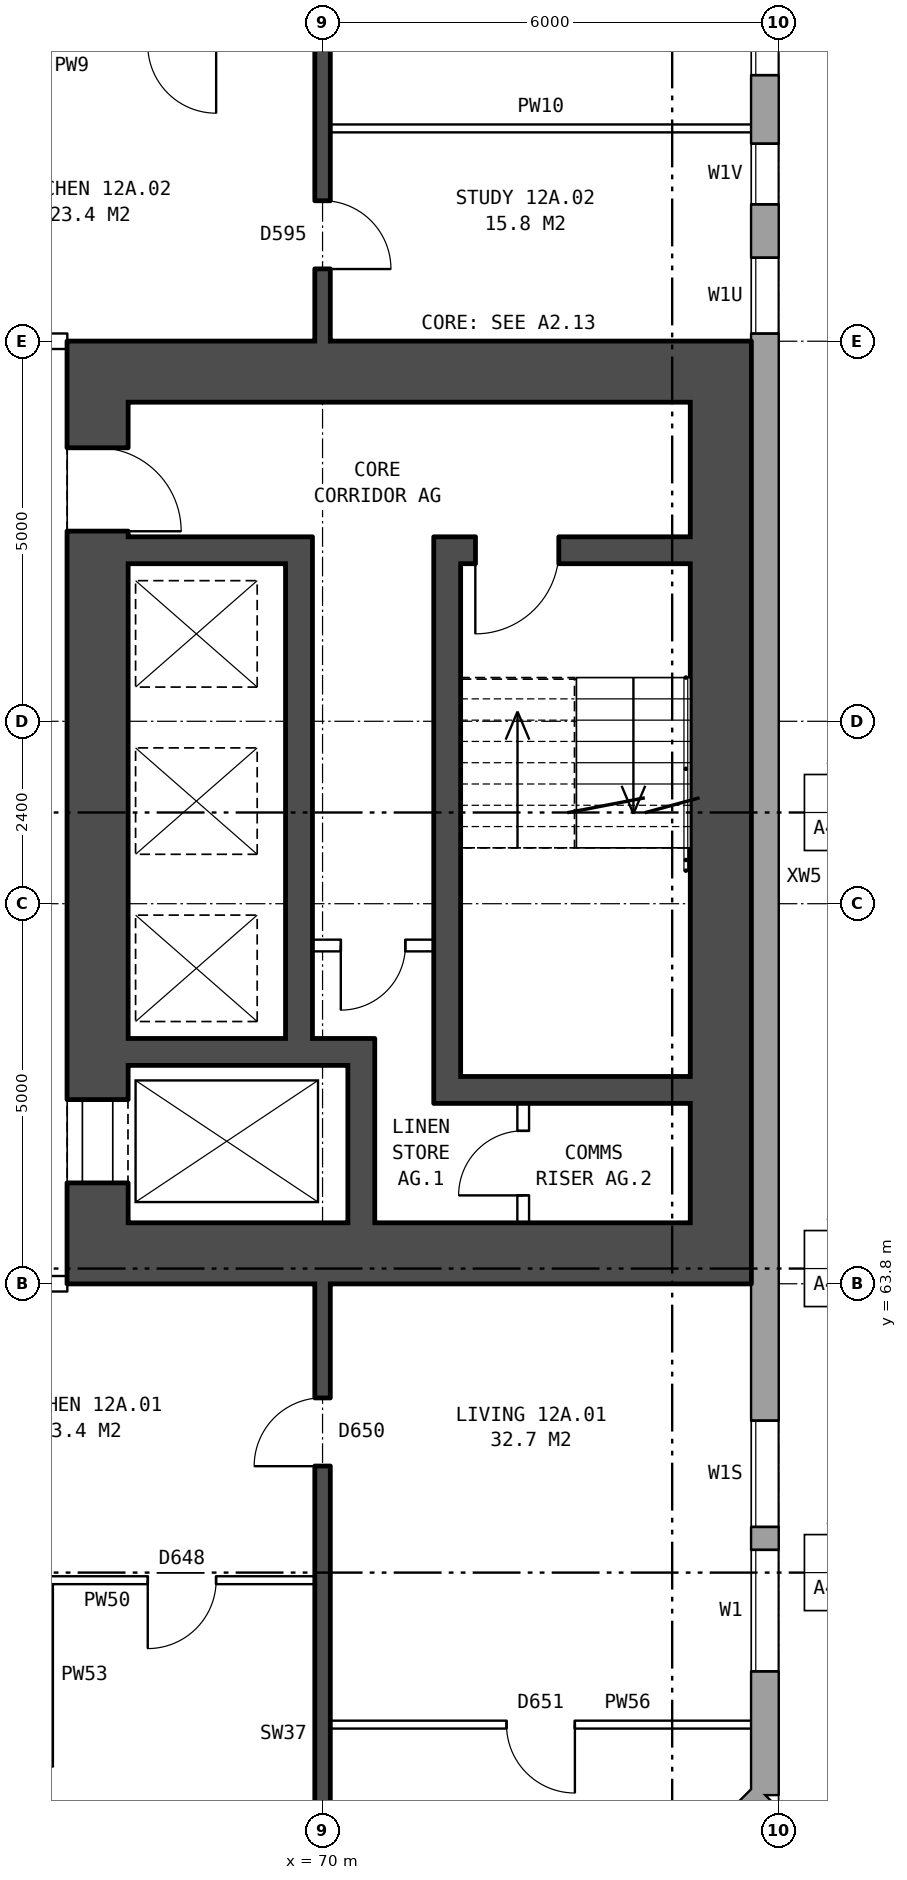
"""IFC4 building model, lengths in metres.
Left out: names, types, materials, properties, quantities, classifications, styles, units other than length and angle.
Written with IfcOpenShell. Run it as: python <this file> out.ifc"""

import sys

from ifc_helpers import new_model, si_unit, direction, frame, frame_2d, origin, place, context, subcontext, project, spatial, rectangle, extrude, element, fill, save


model = new_model("IFC4")
c1 = context("Model", 3, precision=1e-05, world=origin(), true_north=direction((0.0, 1.0)))
c2 = subcontext(c1, "Body", "Model", "MODEL_VIEW")
j1 = project(units=[si_unit("LENGTHUNIT", "METRE"), si_unit("PLANEANGLEUNIT", "RADIAN")], contexts=[c1])
p1 = place(None, origin())
s1 = spatial("IfcSite", under=j1, at=p1, CompositionType="ELEMENT")
p2 = place(p1, origin())
s2 = spatial("IfcBuilding", under=s1, at=p2, CompositionType="ELEMENT")
p3 = place(p2, frame((0.0, 0.0, 47.4)))
s3 = spatial("IfcBuildingStorey", under=s2, at=p3, CompositionType="ELEMENT", Elevation=47.4)
p4 = place(p3, frame((72.925, 54.18, 0.0), z_axis=(0.0, 0.0, 1.0), x_axis=(0.707106781187, 0.707106781187, 0.0)))
e1 = element("IfcWall", 1, at=p4, inside=s3, PredefinedType="STANDARD", context=c2, shape_type="SweptSolid", body=[
    extrude(rectangle(XDim=4.094, YDim=0.36, at=frame_2d((2.047, 0.0))), origin(), (0.0, 0.0, 1.0), 2.85),
])
p5 = place(p4, frame((1.247, 0.0, 0.8)))
e2 = element("IfcOpeningElement", 2, at=p5, cuts=e1, PredefinedType="OPENING", context=c2, shape_type="SweptSolid", body=[
    extrude(rectangle(XDim=1.6, YDim=1.8, at=frame_2d((0.8, 0.9))), frame((0.0, 0.19, 0.0), z_axis=(0.0, -1.0, 0.0), x_axis=(1.0, 0.0, 0.0)), (0.0, 0.0, 1.0), 0.38),
])
p6 = place(p3, frame((75.82, 57.075, 0.0), z_axis=(0.0, 0.0, 1.0), x_axis=(0.0, 1.0, 0.0)))
e3 = element("IfcWall", 3, at=p6, inside=s3, PredefinedType="STANDARD", context=c2, shape_type="SweptSolid", body=[
    extrude(rectangle(XDim=25.851, YDim=0.36, at=frame_2d((12.925, 0.0))), origin(), (0.0, 0.0, 1.0), 2.85),
])
p7 = place(p6, frame((1.625, 0.0, 0.8)))
e4 = element("IfcOpeningElement", 4, at=p7, cuts=e3, PredefinedType="OPENING", context=c2, shape_type="SweptSolid", body=[
    extrude(rectangle(XDim=1.6, YDim=1.8, at=frame_2d((0.8, 0.9))), frame((0.0, 0.19, 0.0), z_axis=(0.0, -1.0, 0.0), x_axis=(1.0, 0.0, 0.0)), (0.0, 0.0, 1.0), 0.38),
])
p8 = place(p6, frame((3.525, 0.0, 1.7)))
e5 = element("IfcOpeningElement", 5, at=p8, cuts=e3, PredefinedType="OPENING", context=c2, shape_type="SweptSolid", body=[
    extrude(rectangle(XDim=1.4, YDim=0.9, at=frame_2d((0.7, 0.45))), frame((0.0, 0.19, 0.0), z_axis=(0.0, -1.0, 0.0), x_axis=(1.0, 0.0, 0.0)), (0.0, 0.0, 1.0), 0.38),
])
p9 = place(p6, frame((19.225, 0.0, 0.45)))
e6 = element("IfcOpeningElement", 6, at=p9, cuts=e3, PredefinedType="OPENING", context=c2, shape_type="SweptSolid", body=[
    extrude(rectangle(XDim=1.0, YDim=0.9, at=frame_2d((0.5, 0.45))), frame((0.0, 0.19, 0.0), z_axis=(0.0, -1.0, 0.0), x_axis=(1.0, 0.0, 0.0)), (0.0, 0.0, 1.0), 0.38),
])
p10 = place(p6, frame((22.625, 0.0, 0.8)))
e7 = element("IfcOpeningElement", 7, at=p10, cuts=e3, PredefinedType="OPENING", context=c2, shape_type="SweptSolid", body=[
    extrude(rectangle(XDim=1.6, YDim=1.8, at=frame_2d((0.8, 0.9))), frame((0.0, 0.19, 0.0), z_axis=(0.0, -1.0, 0.0), x_axis=(1.0, 0.0, 0.0)), (0.0, 0.0, 1.0), 0.38),
])
p11 = place(p6, frame((20.925, 0.0, 1.65)))
e8 = element("IfcOpeningElement", 8, at=p11, cuts=e3, PredefinedType="OPENING", context=c2, shape_type="SweptSolid", body=[
    extrude(rectangle(XDim=0.8, YDim=0.9, at=frame_2d((0.4, 0.45))), frame((0.0, 0.19, 0.0), z_axis=(0.0, -1.0, 0.0), x_axis=(1.0, 0.0, 0.0)), (0.0, 0.0, 1.0), 0.38),
])
p12 = place(p3, frame((67.04, 64.6, 0.0), z_axis=(0.0, 0.0, 1.0), x_axis=(0.0, 1.0, 0.0)))
e9 = element("IfcWall", 9, at=p12, inside=s3, PredefinedType="SHEAR", context=c2, shape_type="SweptSolid", body=[
    extrude(rectangle(XDim=10.8, YDim=0.8, at=frame_2d((5.4, 0.0))), origin(), (0.0, 0.0, 1.0), 2.85),
])
p13 = place(p12, frame((0.525, 0.0, 0.0)))
e10 = element("IfcOpeningElement", 10, at=p13, cuts=e9, PredefinedType="OPENING", context=c2, shape_type="SweptSolid", body=[
    extrude(rectangle(XDim=1.1, YDim=2.1, at=frame_2d((0.55, 1.05))), frame((0.0, 0.41, 0.0), z_axis=(0.0, -1.0, 0.0), x_axis=(1.0, 0.0, 0.0)), (0.0, 0.0, 1.0), 0.82),
])
p14 = place(p12, frame((9.1, 0.0, 0.0)))
e11 = element("IfcOpeningElement", 11, at=p14, cuts=e9, PredefinedType="OPENING", context=c2, shape_type="SweptSolid", body=[
    extrude(rectangle(XDim=1.1, YDim=2.1, at=frame_2d((0.55, 1.05))), frame((0.0, 0.41, 0.0), z_axis=(0.0, -1.0, 0.0), x_axis=(1.0, 0.0, 0.0)), (0.0, 0.0, 1.0), 0.82),
])
p15 = place(p3, frame((75.24, 64.6, 0.0), z_axis=(0.0, 0.0, 1.0), x_axis=(0.0, 1.0, 0.0)))
e12 = element("IfcWall", 12, at=p15, inside=s3, PredefinedType="SHEAR", context=c2, shape_type="SweptSolid", body=[
    extrude(rectangle(XDim=10.8, YDim=0.8, at=frame_2d((5.4, 0.0))), origin(), (0.0, 0.0, 1.0), 2.85),
])
for number, where, z_axis, x_axis in (
    (13, (66.64, 64.2, 0.0), (0.0, 0.0, 1.0), (1.0, 0.0, 0.0)),
    (14, (66.64, 75.8, 0.0), (0.0, 0.0, 1.0), (1.0, 0.0, 0.0)),
):
    element("IfcWall", number, at=place(p3, frame(where, z_axis=z_axis, x_axis=x_axis)), inside=s3, PredefinedType="SHEAR", context=c2, shape_type="SweptSolid", body=[
        extrude(rectangle(XDim=9.0, YDim=0.8, at=frame_2d((4.5, 0.0))), origin(), (0.0, 0.0, 1.0), 2.85),
    ])
p16 = place(p3, frame((71.815, 66.35, 0.0), z_axis=(0.0, 0.0, 1.0), x_axis=(1.0, 0.0, 0.0)))
e15 = element("IfcWall", 15, at=p16, inside=s3, PredefinedType="SHEAR", context=c2, shape_type="SweptSolid", body=[
    extrude(rectangle(XDim=3.025, YDim=0.35, at=frame_2d((1.513, 0.0))), origin(), (0.0, 0.0, 1.0), 2.85),
])
p17 = place(p3, frame((67.44, 66.85, 0.0), z_axis=(0.0, 0.0, 1.0), x_axis=(1.0, 0.0, 0.0)))
e16 = element("IfcWall", 16, at=p17, inside=s3, PredefinedType="SHEAR", context=c2, shape_type="SweptSolid", body=[
    extrude(rectangle(XDim=3.245, YDim=0.35, at=frame_2d((1.623, 0.0))), origin(), (0.0, 0.0, 1.0), 2.85),
])
p18 = place(p3, frame((69.865, 68.25, 0.0), z_axis=(0.0, 0.0, 1.0), x_axis=(1.0, 0.0, 0.0)))
e17 = element("IfcWall", 17, at=p18, inside=s3, PredefinedType="PARTITIONING", context=c2, shape_type="SweptSolid", body=[
    extrude(rectangle(XDim=1.6, YDim=0.15, at=frame_2d((0.8, 0.0))), origin(), (0.0, 0.0, 1.0), 2.85),
])
p19 = place(p18, frame((0.375, 0.0, 0.0)))
e18 = element("IfcOpeningElement", 18, at=p19, cuts=e17, PredefinedType="OPENING", context=c2, shape_type="SweptSolid", body=[
    extrude(rectangle(XDim=0.85, YDim=2.1, at=frame_2d((0.425, 1.05))), frame((0.0, 0.085, 0.0), z_axis=(0.0, -1.0, 0.0), x_axis=(1.0, 0.0, 0.0)), (0.0, 0.0, 1.0), 0.17),
])
p20 = place(p3, frame((67.44, 73.45, 0.0), z_axis=(0.0, 0.0, 1.0), x_axis=(1.0, 0.0, 0.0)))
e19 = element("IfcWall", 19, at=p20, inside=s3, PredefinedType="SHEAR", context=c2, shape_type="SweptSolid", body=[
    extrude(rectangle(XDim=2.075, YDim=0.35, at=frame_2d((1.038, 0.0))), origin(), (0.0, 0.0, 1.0), 2.85),
])
p21 = place(p3, frame((71.815, 73.45, 0.0), z_axis=(0.0, 0.0, 1.0), x_axis=(1.0, 0.0, 0.0)))
e20 = element("IfcWall", 20, at=p21, inside=s3, PredefinedType="SHEAR", context=c2, shape_type="SweptSolid", body=[
    extrude(rectangle(XDim=3.025, YDim=0.35, at=frame_2d((1.513, 0.0))), origin(), (0.0, 0.0, 1.0), 2.85),
])
p22 = place(p21, frame((0.195, 0.0, 0.0)))
e21 = element("IfcOpeningElement", 21, at=p22, cuts=e20, PredefinedType="OPENING", context=c2, shape_type="SweptSolid", body=[
    extrude(rectangle(XDim=1.1, YDim=2.1, at=frame_2d((0.55, 1.05))), frame((0.0, 0.185, 0.0), z_axis=(0.0, -1.0, 0.0), x_axis=(1.0, 0.0, 0.0)), (0.0, 0.0, 1.0), 0.37),
])
p23 = place(p3, frame((69.69, 67.025, 0.0), z_axis=(0.0, 0.0, 1.0), x_axis=(0.0, 1.0, 0.0)))
e22 = element("IfcWall", 22, at=p23, inside=s3, PredefinedType="SHEAR", context=c2, shape_type="SweptSolid", body=[
    extrude(rectangle(XDim=6.6, YDim=0.35, at=frame_2d((3.3, 0.0))), origin(), (0.0, 0.0, 1.0), 2.85),
])
p24 = place(p3, frame((70.51, 64.6, 0.0), z_axis=(0.0, 0.0, 1.0), x_axis=(0.0, 1.0, 0.0)))
e23 = element("IfcWall", 23, at=p24, inside=s3, PredefinedType="SHEAR", context=c2, shape_type="SweptSolid", body=[
    extrude(rectangle(XDim=2.075, YDim=0.35, at=frame_2d((1.038, 0.0))), origin(), (0.0, 0.0, 1.0), 2.85),
])
p25 = place(p3, frame((71.64, 66.175, 0.0), z_axis=(0.0, 0.0, 1.0), x_axis=(0.0, 1.0, 0.0)))
e24 = element("IfcWall", 24, at=p25, inside=s3, PredefinedType="SHEAR", context=c2, shape_type="SweptSolid", body=[
    extrude(rectangle(XDim=7.45, YDim=0.35, at=frame_2d((3.725, 0.0))), origin(), (0.0, 0.0, 1.0), 2.85),
])
p26 = place(p3, frame((72.64, 64.6, 0.0), z_axis=(0.0, 0.0, 1.0), x_axis=(0.0, 1.0, 0.0)))
e25 = element("IfcWall", 25, at=p26, inside=s3, PredefinedType="PARTITIONING", context=c2, shape_type="SweptSolid", body=[
    extrude(rectangle(XDim=1.575, YDim=0.15, at=frame_2d((0.788, 0.0))), origin(), (0.0, 0.0, 1.0), 2.85),
])
p27 = place(p26, frame((0.363, 0.0, 0.0)))
e26 = element("IfcOpeningElement", 26, at=p27, cuts=e25, PredefinedType="OPENING", context=c2, shape_type="SweptSolid", body=[
    extrude(rectangle(XDim=0.85, YDim=2.1, at=frame_2d((0.425, 1.05))), frame((0.0, 0.085, 0.0), z_axis=(0.0, -1.0, 0.0), x_axis=(1.0, 0.0, 0.0)), (0.0, 0.0, 1.0), 0.17),
])
p28 = place(p3, frame((70.1, 58.0, 0.0), z_axis=(0.0, 0.0, 1.0), x_axis=(1.0, 0.0, 0.0)))
e27 = element("IfcWall", 27, at=p28, inside=s3, PredefinedType="PARTITIONING", context=c2, shape_type="SweptSolid", body=[
    extrude(rectangle(XDim=5.54, YDim=0.1, at=frame_2d((2.77, 0.0))), origin(), (0.0, 0.0, 1.0), 2.85),
])
p29 = place(p28, frame((2.32, 0.0, 0.0)))
e28 = element("IfcOpeningElement", 28, at=p29, cuts=e27, PredefinedType="OPENING", context=c2, shape_type="SweptSolid", body=[
    extrude(rectangle(XDim=0.9, YDim=2.1, at=frame_2d((0.45, 1.05))), frame((0.0, 0.06, 0.0), z_axis=(0.0, -1.0, 0.0), x_axis=(1.0, 0.0, 0.0)), (0.0, 0.0, 1.0), 0.12),
])
p30 = place(p3, frame((64.1, 59.9, 0.0), z_axis=(0.0, 0.0, 1.0), x_axis=(1.0, 0.0, 0.0)))
e29 = element("IfcWall", 29, at=p30, inside=s3, PredefinedType="PARTITIONING", context=c2, shape_type="SweptSolid", body=[
    extrude(rectangle(XDim=5.8, YDim=0.1, at=frame_2d((2.9, 0.0))), origin(), (0.0, 0.0, 1.0), 2.85),
])
p31 = place(p30, frame((3.6, 0.0, 0.0)))
e30 = element("IfcOpeningElement", 30, at=p31, cuts=e29, PredefinedType="OPENING", context=c2, shape_type="SweptSolid", body=[
    extrude(rectangle(XDim=0.9, YDim=2.1, at=frame_2d((0.45, 1.05))), frame((0.0, 0.06, 0.0), z_axis=(0.0, -1.0, 0.0), x_axis=(1.0, 0.0, 0.0)), (0.0, 0.0, 1.0), 0.12),
])
p32 = place(p30, frame((0.7, 0.0, 0.0)))
e31 = element("IfcOpeningElement", 31, at=p32, cuts=e29, PredefinedType="OPENING", context=c2, shape_type="SweptSolid", body=[
    extrude(rectangle(XDim=0.9, YDim=2.1, at=frame_2d((0.45, 1.05))), frame((0.0, 0.06, 0.0), z_axis=(0.0, -1.0, 0.0), x_axis=(1.0, 0.0, 0.0)), (0.0, 0.0, 1.0), 0.12),
])
p33 = place(p3, frame((63.64, 63.8, 0.0), z_axis=(0.0, 0.0, 1.0), x_axis=(1.0, 0.0, 0.0)))
e32 = element("IfcWall", 32, at=p33, inside=s3, PredefinedType="PARTITIONING", context=c2, shape_type="SweptSolid", body=[
    extrude(rectangle(XDim=3.0, YDim=0.2, at=frame_2d((1.5, 0.0))), origin(), (0.0, 0.0, 1.0), 2.85),
])
p34 = place(p33, frame((1.18, 0.0, 0.0)))
e33 = element("IfcOpeningElement", 33, at=p34, cuts=e32, PredefinedType="OPENING", context=c2, shape_type="SweptSolid", body=[
    extrude(rectangle(XDim=1.0, YDim=2.1, at=frame_2d((0.5, 1.05))), frame((0.0, 0.11, 0.0), z_axis=(0.0, -1.0, 0.0), x_axis=(1.0, 0.0, 0.0)), (0.0, 0.0, 1.0), 0.22),
])
p35 = place(p3, frame((63.64, 76.2, 0.0), z_axis=(0.0, 0.0, 1.0), x_axis=(1.0, 0.0, 0.0)))
e34 = element("IfcWall", 34, at=p35, inside=s3, PredefinedType="PARTITIONING", context=c2, shape_type="SweptSolid", body=[
    extrude(rectangle(XDim=3.0, YDim=0.2, at=frame_2d((1.5, 0.0))), origin(), (0.0, 0.0, 1.0), 2.85),
])
p36 = place(p35, frame((1.18, 0.0, 0.0)))
e35 = element("IfcOpeningElement", 35, at=p36, cuts=e34, PredefinedType="OPENING", context=c2, shape_type="SweptSolid", body=[
    extrude(rectangle(XDim=1.0, YDim=2.1, at=frame_2d((0.5, 1.05))), frame((0.0, 0.11, 0.0), z_axis=(0.0, -1.0, 0.0), x_axis=(1.0, 0.0, 0.0)), (0.0, 0.0, 1.0), 0.22),
])
p37 = place(p3, frame((70.1, 79.0, 0.0), z_axis=(0.0, 0.0, 1.0), x_axis=(1.0, 0.0, 0.0)))
e36 = element("IfcWall", 36, at=p37, inside=s3, PredefinedType="PARTITIONING", context=c2, shape_type="SweptSolid", body=[
    extrude(rectangle(XDim=5.54, YDim=0.1, at=frame_2d((2.77, 0.0))), origin(), (0.0, 0.0, 1.0), 2.85),
])
p38 = place(p3, frame((66.4, 57.45, 0.0), z_axis=(0.0, 0.0, 1.0), x_axis=(0.0, 1.0, 0.0)))
e37 = element("IfcWall", 37, at=p38, inside=s3, PredefinedType="PARTITIONING", context=c2, shape_type="SweptSolid", body=[
    extrude(rectangle(XDim=2.4, YDim=0.1, at=frame_2d((1.2, 0.0))), origin(), (0.0, 0.0, 1.0), 2.85),
])
p39 = place(p3, frame((70.0, 54.36, 0.0), z_axis=(0.0, 0.0, 1.0), x_axis=(0.0, 1.0, 0.0)))
e38 = element("IfcWall", 38, at=p39, inside=s3, PredefinedType="SOLIDWALL", context=c2, shape_type="SweptSolid", body=[
    extrude(rectangle(XDim=9.44, YDim=0.2, at=frame_2d((4.72, 0.0))), origin(), (0.0, 0.0, 1.0), 2.85),
])
p40 = place(p39, frame((7.04, 0.0, 0.0)))
e39 = element("IfcOpeningElement", 39, at=p40, cuts=e38, PredefinedType="OPENING", context=c2, shape_type="SweptSolid", body=[
    extrude(rectangle(XDim=0.9, YDim=2.1, at=frame_2d((0.45, 1.05))), frame((0.0, 0.11, 0.0), z_axis=(0.0, -1.0, 0.0), x_axis=(1.0, 0.0, 0.0)), (0.0, 0.0, 1.0), 0.22),
])
p41 = place(p3, frame((70.0, 76.2, 0.0), z_axis=(0.0, 0.0, 1.0), x_axis=(0.0, 1.0, 0.0)))
e40 = element("IfcWall", 40, at=p41, inside=s3, PredefinedType="SOLIDWALL", context=c2, shape_type="SweptSolid", body=[
    extrude(rectangle(XDim=9.44, YDim=0.2, at=frame_2d((4.72, 0.0))), origin(), (0.0, 0.0, 1.0), 2.85),
])
p42 = place(p41, frame((6.22, 0.0, 0.0)))
e41 = element("IfcOpeningElement", 41, at=p42, cuts=e40, PredefinedType="OPENING", context=c2, shape_type="SweptSolid", body=[
    extrude(rectangle(XDim=0.9, YDim=2.1, at=frame_2d((0.45, 1.05))), frame((0.0, 0.11, 0.0), z_axis=(0.0, -1.0, 0.0), x_axis=(1.0, 0.0, 0.0)), (0.0, 0.0, 1.0), 0.22),
])
p43 = place(p41, frame((0.95, 0.0, 0.0)))
e42 = element("IfcOpeningElement", 42, at=p43, cuts=e40, PredefinedType="OPENING", context=c2, shape_type="SweptSolid", body=[
    extrude(rectangle(XDim=0.9, YDim=2.1, at=frame_2d((0.45, 1.05))), frame((0.0, 0.11, 0.0), z_axis=(0.0, -1.0, 0.0), x_axis=(1.0, 0.0, 0.0)), (0.0, 0.0, 1.0), 0.22),
])
p44 = place(p7, origin())
e43 = element("IfcWindow", 43, at=p44, inside=s3, PartitioningType="SINGLE_PANEL", PredefinedType="WINDOW", context=c2, shape_type="SweptSolid", body=[
    extrude(rectangle(XDim=1.6, YDim=1.8, at=frame_2d((0.8, 0.9))), frame((0.0, 0.15, 0.0), z_axis=(0.0, -1.0, 0.0), x_axis=(1.0, 0.0, 0.0)), (0.0, 0.0, 1.0), 0.06),
])
fill(e4, e43)
p45 = place(p8, origin())
e44 = element("IfcWindow", 44, at=p45, inside=s3, PartitioningType="SINGLE_PANEL", PredefinedType="WINDOW", context=c2, shape_type="SweptSolid", body=[
    extrude(rectangle(XDim=1.4, YDim=0.9, at=frame_2d((0.7, 0.45))), frame((0.0, 0.15, 0.0), z_axis=(0.0, -1.0, 0.0), x_axis=(1.0, 0.0, 0.0)), (0.0, 0.0, 1.0), 0.06),
])
fill(e5, e44)
p46 = place(p9, origin())
e45 = element("IfcWindow", 45, at=p46, inside=s3, PartitioningType="SINGLE_PANEL", PredefinedType="WINDOW", context=c2, shape_type="SweptSolid", body=[
    extrude(rectangle(XDim=1.0, YDim=0.9, at=frame_2d((0.5, 0.45))), frame((0.0, 0.15, 0.0), z_axis=(0.0, -1.0, 0.0), x_axis=(1.0, 0.0, 0.0)), (0.0, 0.0, 1.0), 0.06),
])
fill(e6, e45)
p47 = place(p10, origin())
e46 = element("IfcWindow", 46, at=p47, inside=s3, PartitioningType="SINGLE_PANEL", PredefinedType="WINDOW", context=c2, shape_type="SweptSolid", body=[
    extrude(rectangle(XDim=1.6, YDim=1.8, at=frame_2d((0.8, 0.9))), frame((0.0, 0.15, 0.0), z_axis=(0.0, -1.0, 0.0), x_axis=(1.0, 0.0, 0.0)), (0.0, 0.0, 1.0), 0.06),
])
fill(e7, e46)
p48 = place(p13, origin())
e47 = element("IfcDoor", 47, at=p48, inside=s3, OperationType="DOUBLE_DOOR_SLIDING", PredefinedType="DOOR", context=c2, shape_type="SweptSolid", body=[
    extrude(rectangle(XDim=1.1, YDim=2.1, at=frame_2d((0.55, 1.05))), frame((0.0, -0.335, 0.0), z_axis=(0.0, -1.0, 0.0), x_axis=(1.0, 0.0, 0.0)), (0.0, 0.0, 1.0), 0.05),
])
fill(e10, e47)
p49 = place(p14, frame((1.1, 0.0, 0.0), z_axis=(0.0, 0.0, 1.0), x_axis=(-1.0, 0.0, 0.0)))
e48 = element("IfcDoor", 48, at=p49, inside=s3, OperationType="SINGLE_SWING_RIGHT", PredefinedType="DOOR", context=c2, shape_type="SweptSolid", body=[
    extrude(rectangle(XDim=1.1, YDim=2.1, at=frame_2d((0.55, 1.05))), frame((0.0, 0.385, 0.0), z_axis=(0.0, -1.0, 0.0), x_axis=(1.0, 0.0, 0.0)), (0.0, 0.0, 1.0), 0.05),
])
fill(e11, e48)
p50 = place(p22, frame((1.1, 0.0, 0.0), z_axis=(0.0, 0.0, 1.0), x_axis=(-1.0, 0.0, 0.0)))
e49 = element("IfcDoor", 49, at=p50, inside=s3, OperationType="SINGLE_SWING_RIGHT", PredefinedType="DOOR", context=c2, shape_type="SweptSolid", body=[
    extrude(rectangle(XDim=1.1, YDim=2.1, at=frame_2d((0.55, 1.05))), frame((0.0, 0.025, 0.0), z_axis=(0.0, -1.0, 0.0), x_axis=(1.0, 0.0, 0.0)), (0.0, 0.0, 1.0), 0.05),
])
fill(e21, e49)
p51 = place(p19, frame((0.85, 0.0, 0.0), z_axis=(0.0, 0.0, 1.0), x_axis=(-1.0, 0.0, 0.0)))
e50 = element("IfcDoor", 50, at=p51, inside=s3, OperationType="SINGLE_SWING_RIGHT", PredefinedType="DOOR", context=c2, shape_type="SweptSolid", body=[
    extrude(rectangle(XDim=0.85, YDim=2.1, at=frame_2d((0.425, 1.05))), frame((0.0, 0.025, 0.0), z_axis=(0.0, -1.0, 0.0), x_axis=(1.0, 0.0, 0.0)), (0.0, 0.0, 1.0), 0.05),
])
fill(e18, e50)
p52 = place(p27, origin())
e51 = element("IfcDoor", 51, at=p52, inside=s3, OperationType="SINGLE_SWING_LEFT", PredefinedType="DOOR", context=c2, shape_type="SweptSolid", body=[
    extrude(rectangle(XDim=0.85, YDim=2.1, at=frame_2d((0.425, 1.05))), frame((0.0, 0.025, 0.0), z_axis=(0.0, -1.0, 0.0), x_axis=(1.0, 0.0, 0.0)), (0.0, 0.0, 1.0), 0.05),
])
fill(e26, e51)
p53 = place(p31, frame((0.9, 0.0, 0.0), z_axis=(0.0, 0.0, 1.0), x_axis=(-1.0, 0.0, 0.0)))
e52 = element("IfcDoor", 52, at=p53, inside=s3, OperationType="SINGLE_SWING_RIGHT", PredefinedType="DOOR", context=c2, shape_type="SweptSolid", body=[
    extrude(rectangle(XDim=0.9, YDim=2.1, at=frame_2d((0.45, 1.05))), frame((0.0, 0.025, 0.0), z_axis=(0.0, -1.0, 0.0), x_axis=(1.0, 0.0, 0.0)), (0.0, 0.0, 1.0), 0.05),
])
fill(e30, e52)
p54 = place(p29, frame((0.9, 0.0, 0.0), z_axis=(0.0, 0.0, 1.0), x_axis=(-1.0, 0.0, 0.0)))
e53 = element("IfcDoor", 53, at=p54, inside=s3, OperationType="SINGLE_SWING_LEFT", PredefinedType="DOOR", context=c2, shape_type="SweptSolid", body=[
    extrude(rectangle(XDim=0.9, YDim=2.1, at=frame_2d((0.45, 1.05))), frame((0.0, 0.025, 0.0), z_axis=(0.0, -1.0, 0.0), x_axis=(1.0, 0.0, 0.0)), (0.0, 0.0, 1.0), 0.05),
])
fill(e28, e53)
p55 = place(p40, origin())
e54 = element("IfcDoor", 54, at=p55, inside=s3, OperationType="SINGLE_SWING_LEFT", PredefinedType="DOOR", context=c2, shape_type="SweptSolid", body=[
    extrude(rectangle(XDim=0.9, YDim=2.1, at=frame_2d((0.45, 1.05))), frame((0.0, 0.025, 0.0), z_axis=(0.0, -1.0, 0.0), x_axis=(1.0, 0.0, 0.0)), (0.0, 0.0, 1.0), 0.05),
])
fill(e39, e54)
p56 = place(p43, frame((0.9, 0.0, 0.0), z_axis=(0.0, 0.0, 1.0), x_axis=(-1.0, 0.0, 0.0)))
e55 = element("IfcDoor", 55, at=p56, inside=s3, OperationType="SINGLE_SWING_RIGHT", PredefinedType="DOOR", context=c2, shape_type="SweptSolid", body=[
    extrude(rectangle(XDim=0.9, YDim=2.1, at=frame_2d((0.45, 1.05))), frame((0.0, 0.025, 0.0), z_axis=(0.0, -1.0, 0.0), x_axis=(1.0, 0.0, 0.0)), (0.0, 0.0, 1.0), 0.05),
])
fill(e42, e55)
p57 = place(p11, origin())
e56 = element("IfcWindow", 56, at=p57, inside=s3, PartitioningType="SINGLE_PANEL", PredefinedType="WINDOW", context=c2, shape_type="SweptSolid", body=[
    extrude(rectangle(XDim=0.8, YDim=0.9, at=frame_2d((0.4, 0.45))), frame((0.0, 0.15, 0.0), z_axis=(0.0, -1.0, 0.0), x_axis=(1.0, 0.0, 0.0)), (0.0, 0.0, 1.0), 0.06),
])
fill(e8, e56)
save(model, sys.argv[1])
